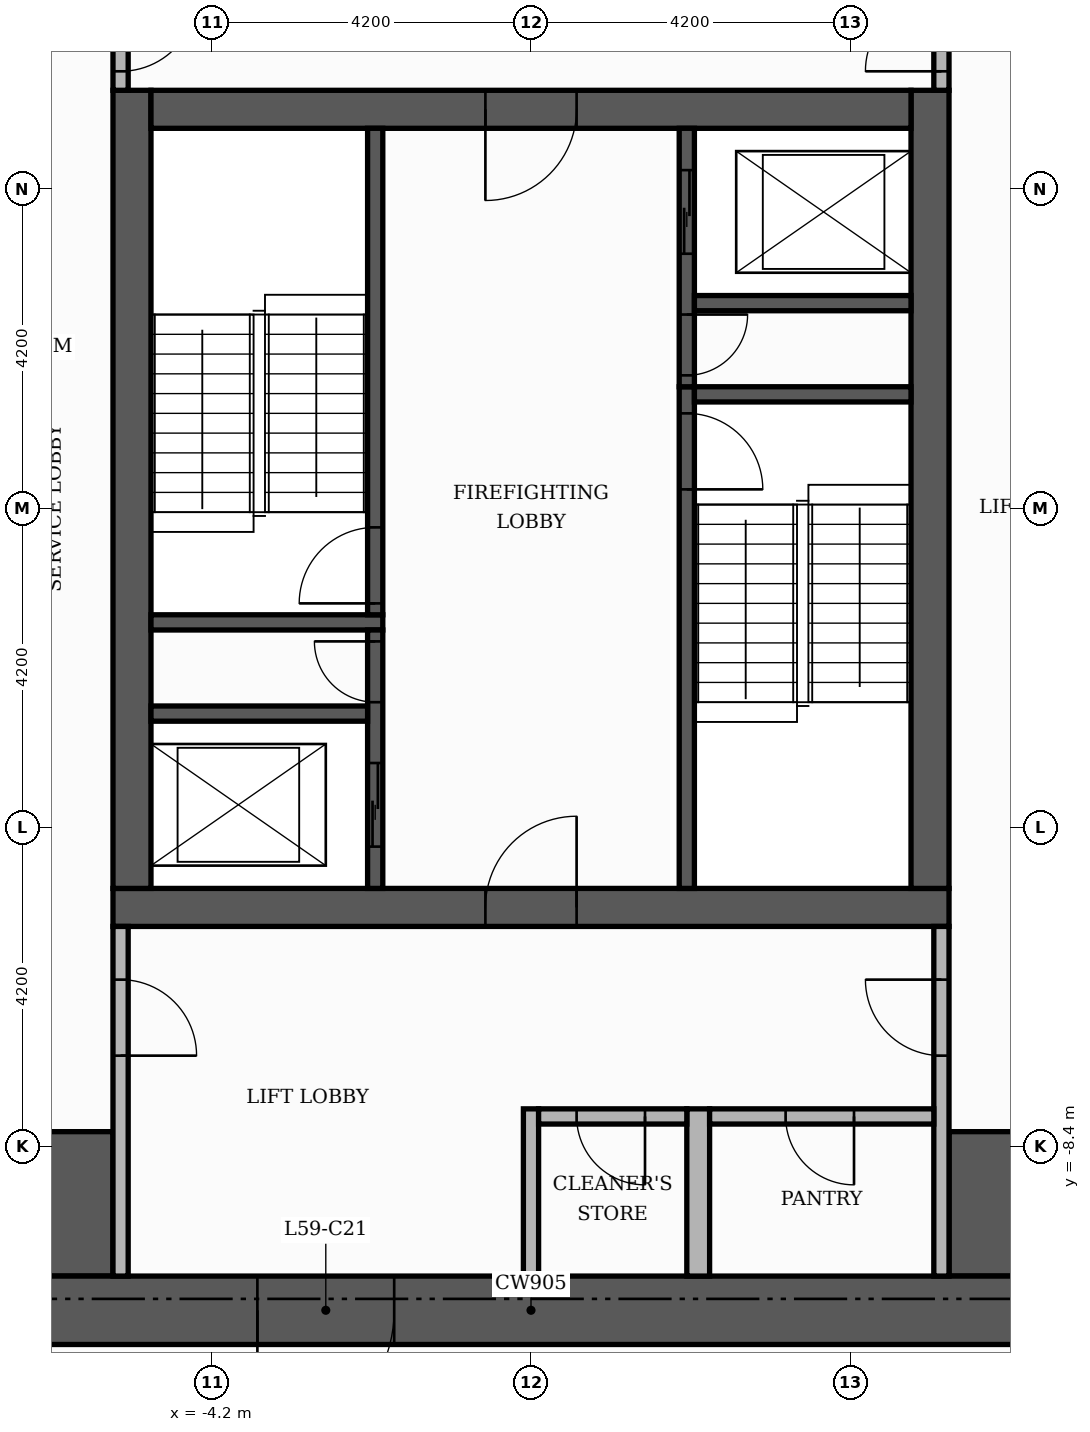
"""IFC4 building model, lengths in metres.
Left out: names, types, materials, properties, quantities, classifications, styles, units other than length and angle.
Written with IfcOpenShell. Run it as: python <this file> out.ifc"""

import sys

from ifc_helpers import new_model, si_unit, direction, frame, frame_2d, origin, place, context, subcontext, project, spatial, rectangle, extrude, element, fill, save


model = new_model("IFC4")
c1 = context("Model", 3, precision=1e-05, world=origin(), true_north=direction((0.0, 1.0)))
c2 = subcontext(c1, "Body", "Model", "MODEL_VIEW")
j1 = project(units=[si_unit("LENGTHUNIT", "METRE"), si_unit("PLANEANGLEUNIT", "RADIAN")], contexts=[c1])
p1 = place(None, origin())
s1 = spatial("IfcSite", under=j1, at=p1, CompositionType="ELEMENT")
p2 = place(p1, origin())
s2 = spatial("IfcBuilding", under=s1, at=p2, CompositionType="ELEMENT")
p3 = place(p2, frame((0.0, 0.0, 248.4)))
s3 = spatial("IfcBuildingStorey", under=s2, at=p3, CompositionType="ELEMENT", Elevation=248.4)
p4 = place(p3, frame((-5.5, -5.25, 0.0), z_axis=(0.0, 0.0, 1.0), x_axis=(1.0, 0.0, 0.0)))
e1 = element("IfcWall", 1, at=p4, inside=s3, PredefinedType="SHEAR", context=c2, shape_type="SweptSolid", body=[
    extrude(rectangle(XDim=11.0, YDim=0.5, at=frame_2d((5.5, 0.0))), origin(), (0.0, 0.0, 1.0), 3.48),
])
p5 = place(p4, frame((4.9, 0.0, 0.0)))
e2 = element("IfcOpeningElement", 2, at=p5, cuts=e1, PredefinedType="OPENING", context=c2, shape_type="SweptSolid", body=[
    extrude(rectangle(XDim=1.2, YDim=2.1, at=frame_2d((0.6, 1.05))), frame((0.0, 0.26, 0.0), z_axis=(0.0, -1.0, 0.0), x_axis=(1.0, 0.0, 0.0)), (0.0, 0.0, 1.0), 0.52),
])
for number, where, z_axis, x_axis in (
    (3, (-5.25, -5.0, 0.0), (0.0, 0.0, 1.0), (0.0, 1.0, 0.0)),
    (4, (5.25, -5.0, 0.0), (0.0, 0.0, 1.0), (0.0, 1.0, 0.0)),
):
    element("IfcWall", number, at=place(p3, frame(where, z_axis=z_axis, x_axis=x_axis)), inside=s3, PredefinedType="SHEAR", context=c2, shape_type="SweptSolid", body=[
        extrude(rectangle(XDim=10.5, YDim=0.5, at=frame_2d((5.25, 0.0))), origin(), (0.0, 0.0, 1.0), 3.48),
    ])
p6 = place(p3, frame((-5.0, 5.25, 0.0), z_axis=(0.0, 0.0, 1.0), x_axis=(1.0, 0.0, 0.0)))
e5 = element("IfcWall", 5, at=p6, inside=s3, PredefinedType="SHEAR", context=c2, shape_type="SweptSolid", body=[
    extrude(rectangle(XDim=10.0, YDim=0.5, at=frame_2d((5.0, 0.0))), origin(), (0.0, 0.0, 1.0), 3.48),
])
p7 = place(p6, frame((4.4, 0.0, 0.0)))
e6 = element("IfcOpeningElement", 6, at=p7, cuts=e5, PredefinedType="OPENING", context=c2, shape_type="SweptSolid", body=[
    extrude(rectangle(XDim=1.2, YDim=2.1, at=frame_2d((0.6, 1.05))), frame((0.0, 0.26, 0.0), z_axis=(0.0, -1.0, 0.0), x_axis=(1.0, 0.0, 0.0)), (0.0, 0.0, 1.0), 0.52),
])
for number, where, z_axis, x_axis in (
    (7, (-10.1, -9.15, 0.0), (0.0, 0.0, 1.0), (1.0, 0.0, 0.0)),
    (8, (5.5, -9.15, 0.0), (0.0, 0.0, 1.0), (1.0, 0.0, 0.0)),
):
    element("IfcWall", number, at=place(p3, frame(where, z_axis=z_axis, x_axis=x_axis)), inside=s3, PredefinedType="SHEAR", context=c2, shape_type="SweptSolid", body=[
        extrude(rectangle(XDim=4.6, YDim=1.9, at=frame_2d((2.3, 0.0))), origin(), (0.0, 0.0, 1.0), 3.48),
    ])
p8 = place(p3, frame((2.05, -5.0, 0.0), z_axis=(0.0, 0.0, 1.0), x_axis=(0.0, 1.0, 0.0)))
e9 = element("IfcWall", 9, at=p8, inside=s3, PredefinedType="SHEAR", context=c2, shape_type="SweptSolid", body=[
    extrude(rectangle(XDim=6.6, YDim=0.2, at=frame_2d((3.3, 0.0))), origin(), (0.0, 0.0, 1.0), 3.48),
])
p9 = place(p8, frame((5.25, 0.0, 0.0)))
e10 = element("IfcOpeningElement", 10, at=p9, cuts=e9, PredefinedType="OPENING", context=c2, shape_type="SweptSolid", body=[
    extrude(rectangle(XDim=1.0, YDim=2.1, at=frame_2d((0.5, 1.05))), frame((0.0, 0.11, 0.0), z_axis=(0.0, -1.0, 0.0), x_axis=(1.0, 0.0, 0.0)), (0.0, 0.0, 1.0), 0.22),
])
p10 = place(p3, frame((-5.0, -1.5, 0.0), z_axis=(0.0, 0.0, 1.0), x_axis=(1.0, 0.0, 0.0)))
e11 = element("IfcWall", 11, at=p10, inside=s3, PredefinedType="SHEAR", context=c2, shape_type="SweptSolid", body=[
    extrude(rectangle(XDim=3.05, YDim=0.2, at=frame_2d((1.525, 0.0))), origin(), (0.0, 0.0, 1.0), 3.48),
])
p11 = place(p3, frame((-2.05, -1.4, 0.0), z_axis=(0.0, 0.0, 1.0), x_axis=(0.0, 1.0, 0.0)))
e12 = element("IfcWall", 12, at=p11, inside=s3, PredefinedType="SHEAR", context=c2, shape_type="SweptSolid", body=[
    extrude(rectangle(XDim=6.4, YDim=0.2, at=frame_2d((3.2, 0.0))), origin(), (0.0, 0.0, 1.0), 3.48),
])
p12 = place(p11, frame((0.15, 0.0, 0.0)))
e13 = element("IfcOpeningElement", 13, at=p12, cuts=e12, PredefinedType="OPENING", context=c2, shape_type="SweptSolid", body=[
    extrude(rectangle(XDim=1.0, YDim=2.1, at=frame_2d((0.5, 1.05))), frame((0.0, 0.11, 0.0), z_axis=(0.0, -1.0, 0.0), x_axis=(1.0, 0.0, 0.0)), (0.0, 0.0, 1.0), 0.22),
])
p13 = place(p3, frame((2.15, 1.5, 0.0), z_axis=(0.0, 0.0, 1.0), x_axis=(1.0, 0.0, 0.0)))
e14 = element("IfcWall", 14, at=p13, inside=s3, PredefinedType="SHEAR", context=c2, shape_type="SweptSolid", body=[
    extrude(rectangle(XDim=2.85, YDim=0.2, at=frame_2d((1.425, 0.0))), origin(), (0.0, 0.0, 1.0), 3.48),
])
p14 = place(p3, frame((-2.05, -5.0, 0.0), z_axis=(0.0, 0.0, 1.0), x_axis=(0.0, 1.0, 0.0)))
e15 = element("IfcWall", 15, at=p14, inside=s3, PredefinedType="SHEAR", context=c2, shape_type="SweptSolid", body=[
    extrude(rectangle(XDim=3.4, YDim=0.2, at=frame_2d((1.7, 0.0))), origin(), (0.0, 0.0, 1.0), 3.48),
])
p15 = place(p14, frame((0.55, 0.0, 0.0)))
e16 = element("IfcOpeningElement", 16, at=p15, cuts=e15, PredefinedType="OPENING", context=c2, shape_type="SweptSolid", body=[
    extrude(rectangle(XDim=1.1, YDim=2.1, at=frame_2d((0.55, 1.05))), frame((0.0, 0.11, 0.0), z_axis=(0.0, -1.0, 0.0), x_axis=(1.0, 0.0, 0.0)), (0.0, 0.0, 1.0), 0.22),
])
p16 = place(p14, frame((2.45, 0.0, 0.0)))
e17 = element("IfcOpeningElement", 17, at=p16, cuts=e15, PredefinedType="OPENING", context=c2, shape_type="SweptSolid", body=[
    extrude(rectangle(XDim=0.8, YDim=2.1, at=frame_2d((0.4, 1.05))), frame((0.0, 0.11, 0.0), z_axis=(0.0, -1.0, 0.0), x_axis=(1.0, 0.0, 0.0)), (0.0, 0.0, 1.0), 0.22),
])
p17 = place(p3, frame((-5.0, -2.7, 0.0), z_axis=(0.0, 0.0, 1.0), x_axis=(1.0, 0.0, 0.0)))
e18 = element("IfcWall", 18, at=p17, inside=s3, PredefinedType="SHEAR", context=c2, shape_type="SweptSolid", body=[
    extrude(rectangle(XDim=2.85, YDim=0.2, at=frame_2d((1.425, 0.0))), origin(), (0.0, 0.0, 1.0), 3.48),
])
p18 = place(p3, frame((2.05, 1.6, 0.0), z_axis=(0.0, 0.0, 1.0), x_axis=(0.0, 1.0, 0.0)))
e19 = element("IfcWall", 19, at=p18, inside=s3, PredefinedType="SHEAR", context=c2, shape_type="SweptSolid", body=[
    extrude(rectangle(XDim=3.4, YDim=0.2, at=frame_2d((1.7, 0.0))), origin(), (0.0, 0.0, 1.0), 3.48),
])
p19 = place(p18, frame((1.75, 0.0, 0.0)))
e20 = element("IfcOpeningElement", 20, at=p19, cuts=e19, PredefinedType="OPENING", context=c2, shape_type="SweptSolid", body=[
    extrude(rectangle(XDim=1.1, YDim=2.1, at=frame_2d((0.55, 1.05))), frame((0.0, 0.11, 0.0), z_axis=(0.0, -1.0, 0.0), x_axis=(1.0, 0.0, 0.0)), (0.0, 0.0, 1.0), 0.22),
])
p20 = place(p18, frame((0.15, 0.0, 0.0)))
e21 = element("IfcOpeningElement", 21, at=p20, cuts=e19, PredefinedType="OPENING", context=c2, shape_type="SweptSolid", body=[
    extrude(rectangle(XDim=0.8, YDim=2.1, at=frame_2d((0.4, 1.05))), frame((0.0, 0.11, 0.0), z_axis=(0.0, -1.0, 0.0), x_axis=(1.0, 0.0, 0.0)), (0.0, 0.0, 1.0), 0.22),
])
p21 = place(p3, frame((2.15, 2.7, 0.0), z_axis=(0.0, 0.0, 1.0), x_axis=(1.0, 0.0, 0.0)))
e22 = element("IfcWall", 22, at=p21, inside=s3, PredefinedType="SHEAR", context=c2, shape_type="SweptSolid", body=[
    extrude(rectangle(XDim=2.85, YDim=0.2, at=frame_2d((1.425, 0.0))), origin(), (0.0, 0.0, 1.0), 3.48),
])
p22 = place(p3, frame((-11.0, -10.55, 0.0), z_axis=(0.0, 0.0, 1.0), x_axis=(1.0, 0.0, 0.0)))
e23 = element("IfcWall", 23, at=p22, inside=s3, PredefinedType="SHEAR", context=c2, shape_type="SweptSolid", body=[
    extrude(rectangle(XDim=22.0, YDim=0.9, at=frame_2d((11.0, 0.0))), origin(), (0.0, 0.0, 1.0), 3.48),
])
p23 = place(p22, frame((7.4, 0.0, 0.0)))
e24 = element("IfcOpeningElement", 24, at=p23, cuts=e23, PredefinedType="OPENING", context=c2, shape_type="SweptSolid", body=[
    extrude(rectangle(XDim=1.8, YDim=2.2, at=frame_2d((0.9, 1.1))), frame((0.0, 0.46, 0.0), z_axis=(0.0, -1.0, 0.0), x_axis=(1.0, 0.0, 0.0)), (0.0, 0.0, 1.0), 0.92),
])
p24 = place(p3, frame((-5.4, -10.1, 0.0), z_axis=(0.0, 0.0, 1.0), x_axis=(0.0, 1.0, 0.0)))
e25 = element("IfcWall", 25, at=p24, inside=s3, PredefinedType="PARTITIONING", context=c2, shape_type="SweptSolid", body=[
    extrude(rectangle(XDim=4.6, YDim=0.2, at=frame_2d((2.3, 0.0))), origin(), (0.0, 0.0, 1.0), 3.48),
])
p25 = place(p24, frame((2.9, 0.0, 0.0)))
e26 = element("IfcOpeningElement", 26, at=p25, cuts=e25, PredefinedType="OPENING", context=c2, shape_type="SweptSolid", body=[
    extrude(rectangle(XDim=1.0, YDim=2.1, at=frame_2d((0.5, 1.05))), frame((0.0, 0.11, 0.0), z_axis=(0.0, -1.0, 0.0), x_axis=(1.0, 0.0, 0.0)), (0.0, 0.0, 1.0), 0.22),
])
p26 = place(p3, frame((0.0, -10.1, 0.0), z_axis=(0.0, 0.0, 1.0), x_axis=(0.0, 1.0, 0.0)))
e27 = element("IfcWall", 27, at=p26, inside=s3, PredefinedType="PARTITIONING", context=c2, shape_type="SweptSolid", body=[
    extrude(rectangle(XDim=2.2, YDim=0.2, at=frame_2d((1.1, 0.0))), origin(), (0.0, 0.0, 1.0), 3.48),
])
p27 = place(p3, frame((2.2, -10.1, 0.0), z_axis=(0.0, 0.0, 1.0), x_axis=(0.0, 1.0, 0.0)))
e28 = element("IfcWall", 28, at=p27, inside=s3, PredefinedType="PARTITIONING", context=c2, shape_type="SweptSolid", body=[
    extrude(rectangle(XDim=2.2, YDim=0.3, at=frame_2d((1.1, 0.0))), origin(), (0.0, 0.0, 1.0), 3.48),
])
p28 = place(p3, frame((5.4, -10.1, 0.0), z_axis=(0.0, 0.0, 1.0), x_axis=(0.0, 1.0, 0.0)))
e29 = element("IfcWall", 29, at=p28, inside=s3, PredefinedType="PARTITIONING", context=c2, shape_type="SweptSolid", body=[
    extrude(rectangle(XDim=4.6, YDim=0.2, at=frame_2d((2.3, 0.0))), origin(), (0.0, 0.0, 1.0), 3.48),
])
p29 = place(p28, frame((2.9, 0.0, 0.0)))
e30 = element("IfcOpeningElement", 30, at=p29, cuts=e29, PredefinedType="OPENING", context=c2, shape_type="SweptSolid", body=[
    extrude(rectangle(XDim=1.0, YDim=2.1, at=frame_2d((0.5, 1.05))), frame((0.0, 0.11, 0.0), z_axis=(0.0, -1.0, 0.0), x_axis=(1.0, 0.0, 0.0)), (0.0, 0.0, 1.0), 0.22),
])
p30 = place(p3, frame((0.1, -8.0, 0.0), z_axis=(0.0, 0.0, 1.0), x_axis=(1.0, 0.0, 0.0)))
e31 = element("IfcWall", 31, at=p30, inside=s3, PredefinedType="PARTITIONING", context=c2, shape_type="SweptSolid", body=[
    extrude(rectangle(XDim=1.95, YDim=0.2, at=frame_2d((0.975, 0.0))), origin(), (0.0, 0.0, 1.0), 3.48),
])
p31 = place(p30, frame((0.5, 0.0, 0.0)))
e32 = element("IfcOpeningElement", 32, at=p31, cuts=e31, PredefinedType="OPENING", context=c2, shape_type="SweptSolid", body=[
    extrude(rectangle(XDim=0.9, YDim=2.1, at=frame_2d((0.45, 1.05))), frame((0.0, 0.11, 0.0), z_axis=(0.0, -1.0, 0.0), x_axis=(1.0, 0.0, 0.0)), (0.0, 0.0, 1.0), 0.22),
])
p32 = place(p3, frame((2.35, -8.0, 0.0), z_axis=(0.0, 0.0, 1.0), x_axis=(1.0, 0.0, 0.0)))
e33 = element("IfcWall", 33, at=p32, inside=s3, PredefinedType="PARTITIONING", context=c2, shape_type="SweptSolid", body=[
    extrude(rectangle(XDim=2.95, YDim=0.2, at=frame_2d((1.475, 0.0))), origin(), (0.0, 0.0, 1.0), 3.48),
])
p33 = place(p32, frame((1.0, 0.0, 0.0)))
e34 = element("IfcOpeningElement", 34, at=p33, cuts=e33, PredefinedType="OPENING", context=c2, shape_type="SweptSolid", body=[
    extrude(rectangle(XDim=0.9, YDim=2.1, at=frame_2d((0.45, 1.05))), frame((0.0, 0.11, 0.0), z_axis=(0.0, -1.0, 0.0), x_axis=(1.0, 0.0, 0.0)), (0.0, 0.0, 1.0), 0.22),
])
p34 = place(p3, frame((-5.4, 5.5, 0.0), z_axis=(0.0, 0.0, 1.0), x_axis=(0.0, 1.0, 0.0)))
e35 = element("IfcWall", 35, at=p34, inside=s3, PredefinedType="PARTITIONING", context=c2, shape_type="SweptSolid", body=[
    extrude(rectangle(XDim=1.55, YDim=0.2, at=frame_2d((0.775, 0.0))), origin(), (0.0, 0.0, 1.0), 3.48),
])
p35 = place(p34, frame((0.25, 0.0, 0.0)))
e36 = element("IfcOpeningElement", 36, at=p35, cuts=e35, PredefinedType="OPENING", context=c2, shape_type="SweptSolid", body=[
    extrude(rectangle(XDim=1.0, YDim=2.1, at=frame_2d((0.5, 1.05))), frame((0.0, 0.11, 0.0), z_axis=(0.0, -1.0, 0.0), x_axis=(1.0, 0.0, 0.0)), (0.0, 0.0, 1.0), 0.22),
])
p36 = place(p3, frame((5.4, 5.5, 0.0), z_axis=(0.0, 0.0, 1.0), x_axis=(0.0, 1.0, 0.0)))
e37 = element("IfcWall", 37, at=p36, inside=s3, PredefinedType="PARTITIONING", context=c2, shape_type="SweptSolid", body=[
    extrude(rectangle(XDim=4.6, YDim=0.2, at=frame_2d((2.3, 0.0))), origin(), (0.0, 0.0, 1.0), 3.48),
])
p37 = place(p36, frame((0.25, 0.0, 0.0)))
e38 = element("IfcOpeningElement", 38, at=p37, cuts=e37, PredefinedType="OPENING", context=c2, shape_type="SweptSolid", body=[
    extrude(rectangle(XDim=1.0, YDim=2.1, at=frame_2d((0.5, 1.05))), frame((0.0, 0.11, 0.0), z_axis=(0.0, -1.0, 0.0), x_axis=(1.0, 0.0, 0.0)), (0.0, 0.0, 1.0), 0.22),
])
p38 = place(p19, origin())
e39 = element("IfcDoor", 39, at=p38, inside=s3, OperationType="SLIDING_TO_LEFT", PredefinedType="DOOR", context=c2, shape_type="SweptSolid", body=[
    extrude(rectangle(XDim=1.1, YDim=2.1, at=frame_2d((0.55, 1.05))), frame((0.0, 0.025, 0.0), z_axis=(0.0, -1.0, 0.0), x_axis=(1.0, 0.0, 0.0)), (0.0, 0.0, 1.0), 0.05),
])
fill(e20, e39)
p39 = place(p15, origin())
e40 = element("IfcDoor", 40, at=p39, inside=s3, OperationType="SLIDING_TO_LEFT", PredefinedType="DOOR", context=c2, shape_type="SweptSolid", body=[
    extrude(rectangle(XDim=1.1, YDim=2.1, at=frame_2d((0.55, 1.05))), frame((0.0, 0.025, 0.0), z_axis=(0.0, -1.0, 0.0), x_axis=(1.0, 0.0, 0.0)), (0.0, 0.0, 1.0), 0.05),
])
fill(e16, e40)
p40 = place(p12, origin())
e41 = element("IfcDoor", 41, at=p40, inside=s3, OperationType="SINGLE_SWING_LEFT", PredefinedType="DOOR", context=c2, shape_type="SweptSolid", body=[
    extrude(rectangle(XDim=1.0, YDim=2.1, at=frame_2d((0.5, 1.05))), frame((0.0, 0.025, 0.0), z_axis=(0.0, -1.0, 0.0), x_axis=(1.0, 0.0, 0.0)), (0.0, 0.0, 1.0), 0.05),
])
fill(e13, e41)
p41 = place(p9, frame((1.0, 0.0, 0.0), z_axis=(0.0, 0.0, 1.0), x_axis=(-1.0, 0.0, 0.0)))
e42 = element("IfcDoor", 42, at=p41, inside=s3, OperationType="SINGLE_SWING_LEFT", PredefinedType="DOOR", context=c2, shape_type="SweptSolid", body=[
    extrude(rectangle(XDim=1.0, YDim=2.1, at=frame_2d((0.5, 1.05))), frame((0.0, 0.025, 0.0), z_axis=(0.0, -1.0, 0.0), x_axis=(1.0, 0.0, 0.0)), (0.0, 0.0, 1.0), 0.05),
])
fill(e10, e42)
p42 = place(p20, frame((0.8, 0.0, 0.0), z_axis=(0.0, 0.0, 1.0), x_axis=(-1.0, 0.0, 0.0)))
e43 = element("IfcDoor", 43, at=p42, inside=s3, OperationType="SINGLE_SWING_RIGHT", PredefinedType="DOOR", context=c2, shape_type="SweptSolid", body=[
    extrude(rectangle(XDim=0.8, YDim=2.1, at=frame_2d((0.4, 1.05))), frame((0.0, 0.025, 0.0), z_axis=(0.0, -1.0, 0.0), x_axis=(1.0, 0.0, 0.0)), (0.0, 0.0, 1.0), 0.05),
])
fill(e21, e43)
p43 = place(p16, origin())
e44 = element("IfcDoor", 44, at=p43, inside=s3, OperationType="SINGLE_SWING_RIGHT", PredefinedType="DOOR", context=c2, shape_type="SweptSolid", body=[
    extrude(rectangle(XDim=0.8, YDim=2.1, at=frame_2d((0.4, 1.05))), frame((0.0, 0.025, 0.0), z_axis=(0.0, -1.0, 0.0), x_axis=(1.0, 0.0, 0.0)), (0.0, 0.0, 1.0), 0.05),
])
fill(e17, e44)
p44 = place(p7, frame((1.2, 0.0, 0.0), z_axis=(0.0, 0.0, 1.0), x_axis=(-1.0, 0.0, 0.0)))
e45 = element("IfcDoor", 45, at=p44, inside=s3, OperationType="SINGLE_SWING_LEFT", PredefinedType="DOOR", context=c2, shape_type="SweptSolid", body=[
    extrude(rectangle(XDim=1.2, YDim=2.1, at=frame_2d((0.6, 1.05))), frame((0.0, 0.025, 0.0), z_axis=(0.0, -1.0, 0.0), x_axis=(1.0, 0.0, 0.0)), (0.0, 0.0, 1.0), 0.05),
])
fill(e6, e45)
p45 = place(p5, origin())
e46 = element("IfcDoor", 46, at=p45, inside=s3, OperationType="SINGLE_SWING_RIGHT", PredefinedType="DOOR", context=c2, shape_type="SweptSolid", body=[
    extrude(rectangle(XDim=1.2, YDim=2.1, at=frame_2d((0.6, 1.05))), frame((0.0, 0.025, 0.0), z_axis=(0.0, -1.0, 0.0), x_axis=(1.0, 0.0, 0.0)), (0.0, 0.0, 1.0), 0.05),
])
fill(e2, e46)
p46 = place(p35, frame((1.0, 0.0, 0.0), z_axis=(0.0, 0.0, 1.0), x_axis=(-1.0, 0.0, 0.0)))
e47 = element("IfcDoor", 47, at=p46, inside=s3, OperationType="SINGLE_SWING_RIGHT", PredefinedType="DOOR", context=c2, shape_type="SweptSolid", body=[
    extrude(rectangle(XDim=1.0, YDim=2.1, at=frame_2d((0.5, 1.05))), frame((0.0, 0.025, 0.0), z_axis=(0.0, -1.0, 0.0), x_axis=(1.0, 0.0, 0.0)), (0.0, 0.0, 1.0), 0.05),
])
fill(e36, e47)
p47 = place(p37, origin())
e48 = element("IfcDoor", 48, at=p47, inside=s3, OperationType="SINGLE_SWING_LEFT", PredefinedType="DOOR", context=c2, shape_type="SweptSolid", body=[
    extrude(rectangle(XDim=1.0, YDim=2.1, at=frame_2d((0.5, 1.05))), frame((0.0, 0.025, 0.0), z_axis=(0.0, -1.0, 0.0), x_axis=(1.0, 0.0, 0.0)), (0.0, 0.0, 1.0), 0.05),
])
fill(e38, e48)
p48 = place(p25, frame((1.0, 0.0, 0.0), z_axis=(0.0, 0.0, 1.0), x_axis=(-1.0, 0.0, 0.0)))
e49 = element("IfcDoor", 49, at=p48, inside=s3, OperationType="SINGLE_SWING_LEFT", PredefinedType="DOOR", context=c2, shape_type="SweptSolid", body=[
    extrude(rectangle(XDim=1.0, YDim=2.1, at=frame_2d((0.5, 1.05))), frame((0.0, 0.025, 0.0), z_axis=(0.0, -1.0, 0.0), x_axis=(1.0, 0.0, 0.0)), (0.0, 0.0, 1.0), 0.05),
])
fill(e26, e49)
p49 = place(p29, origin())
e50 = element("IfcDoor", 50, at=p49, inside=s3, OperationType="SINGLE_SWING_RIGHT", PredefinedType="DOOR", context=c2, shape_type="SweptSolid", body=[
    extrude(rectangle(XDim=1.0, YDim=2.1, at=frame_2d((0.5, 1.05))), frame((0.0, 0.025, 0.0), z_axis=(0.0, -1.0, 0.0), x_axis=(1.0, 0.0, 0.0)), (0.0, 0.0, 1.0), 0.05),
])
fill(e30, e50)
p50 = place(p23, frame((1.8, 0.0, 0.0), z_axis=(0.0, 0.0, 1.0), x_axis=(-1.0, 0.0, 0.0)))
e51 = element("IfcDoor", 51, at=p50, inside=s3, OperationType="DOUBLE_DOOR_SINGLE_SWING", PredefinedType="DOOR", context=c2, shape_type="SweptSolid", body=[
    extrude(rectangle(XDim=1.8, YDim=2.2, at=frame_2d((0.9, 1.1))), frame((0.0, 0.025, 0.0), z_axis=(0.0, -1.0, 0.0), x_axis=(1.0, 0.0, 0.0)), (0.0, 0.0, 1.0), 0.05),
])
fill(e24, e51)
p51 = place(p31, frame((0.9, 0.0, 0.0), z_axis=(0.0, 0.0, 1.0), x_axis=(-1.0, 0.0, 0.0)))
e52 = element("IfcDoor", 52, at=p51, inside=s3, OperationType="SINGLE_SWING_RIGHT", PredefinedType="DOOR", context=c2, shape_type="SweptSolid", body=[
    extrude(rectangle(XDim=0.9, YDim=2.1, at=frame_2d((0.45, 1.05))), frame((0.0, 0.025, 0.0), z_axis=(0.0, -1.0, 0.0), x_axis=(1.0, 0.0, 0.0)), (0.0, 0.0, 1.0), 0.05),
])
fill(e32, e52)
p52 = place(p33, frame((0.9, 0.0, 0.0), z_axis=(0.0, 0.0, 1.0), x_axis=(-1.0, 0.0, 0.0)))
e53 = element("IfcDoor", 53, at=p52, inside=s3, OperationType="SINGLE_SWING_RIGHT", PredefinedType="DOOR", context=c2, shape_type="SweptSolid", body=[
    extrude(rectangle(XDim=0.9, YDim=2.1, at=frame_2d((0.45, 1.05))), frame((0.0, 0.025, 0.0), z_axis=(0.0, -1.0, 0.0), x_axis=(1.0, 0.0, 0.0)), (0.0, 0.0, 1.0), 0.05),
])
fill(e34, e53)
save(model, sys.argv[1])
